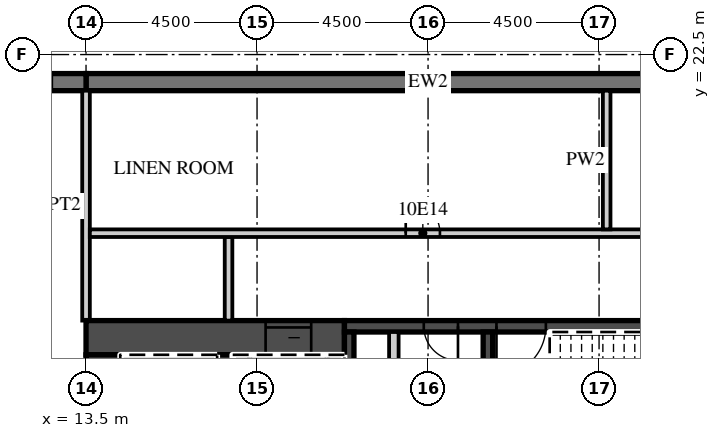
"""IFC4 building model, lengths in metres.
Left out: names, types, materials, properties, quantities, classifications, styles, units other than length and angle.
Written with IfcOpenShell. Run it as: python <this file> out.ifc"""

import sys

from ifc_helpers import new_model, si_unit, direction, frame, frame_2d, origin, place, context, subcontext, project, spatial, rectangle, extrude, element, fill, save


model = new_model("IFC4")
c1 = context("Model", 3, precision=1e-05, world=origin(), true_north=direction((0.0, 1.0)))
c2 = subcontext(c1, "Body", "Model", "MODEL_VIEW")
j1 = project(units=[si_unit("LENGTHUNIT", "METRE"), si_unit("PLANEANGLEUNIT", "RADIAN")], contexts=[c1])
p1 = place(None, origin())
s1 = spatial("IfcSite", under=j1, at=p1, CompositionType="ELEMENT")
p2 = place(p1, origin())
s2 = spatial("IfcBuilding", under=s1, at=p2, CompositionType="ELEMENT")
p3 = place(p2, frame((0.0, 0.0, 63.3)))
s3 = spatial("IfcBuildingStorey", under=s2, at=p3, CompositionType="ELEMENT", Elevation=63.3)
p4 = place(p3, frame((31.5, 21.775, 0.0), z_axis=(0.0, 0.0, 1.0), x_axis=(-1.0, 0.0, 0.0)))
e1 = element("IfcWall", 1, at=p4, inside=s3, PredefinedType="SOLIDWALL", context=c2, shape_type="SweptSolid", body=[
    extrude(rectangle(XDim=18.0, YDim=0.45, at=frame_2d((9.0, 0.0))), origin(), (0.0, 0.0, 1.0), 3.02),
])
p5 = place(p3, frame((13.5, 21.775, 0.0), z_axis=(0.0, 0.0, 1.0), x_axis=(-1.0, 0.0, 0.0)))
e2 = element("IfcWall", 2, at=p5, inside=s3, PredefinedType="SOLIDWALL", context=c2, shape_type="SweptSolid", body=[
    extrude(rectangle(XDim=54.5, YDim=0.45, at=frame_2d((27.25, 0.0))), origin(), (0.0, 0.0, 1.0), 3.02),
])
p6 = place(p5, frame((0.9, 0.0, 0.45)))
e3 = element("IfcOpeningElement", 3, at=p6, cuts=e2, PredefinedType="OPENING", context=c2, shape_type="SweptSolid", body=[
    extrude(rectangle(XDim=2.7, YDim=2.25, at=frame_2d((1.35, 1.125))), frame((0.0, 0.235, 0.0), z_axis=(0.0, -1.0, 0.0), x_axis=(1.0, 0.0, 0.0)), (0.0, 0.0, 1.0), 0.47),
])
p7 = place(p5, frame((5.4, 0.0, 0.45)))
e4 = element("IfcOpeningElement", 4, at=p7, cuts=e2, PredefinedType="OPENING", context=c2, shape_type="SweptSolid", body=[
    extrude(rectangle(XDim=2.7, YDim=2.25, at=frame_2d((1.35, 1.125))), frame((0.0, 0.235, 0.0), z_axis=(0.0, -1.0, 0.0), x_axis=(1.0, 0.0, 0.0)), (0.0, 0.0, 1.0), 0.47),
])
p8 = place(p5, frame((9.9, 0.0, 0.45)))
e5 = element("IfcOpeningElement", 5, at=p8, cuts=e2, PredefinedType="OPENING", context=c2, shape_type="SweptSolid", body=[
    extrude(rectangle(XDim=2.7, YDim=2.25, at=frame_2d((1.35, 1.125))), frame((0.0, 0.235, 0.0), z_axis=(0.0, -1.0, 0.0), x_axis=(1.0, 0.0, 0.0)), (0.0, 0.0, 1.0), 0.47),
])
p9 = place(p5, frame((14.4, 0.0, 0.45)))
e6 = element("IfcOpeningElement", 6, at=p9, cuts=e2, PredefinedType="OPENING", context=c2, shape_type="SweptSolid", body=[
    extrude(rectangle(XDim=2.7, YDim=2.25, at=frame_2d((1.35, 1.125))), frame((0.0, 0.235, 0.0), z_axis=(0.0, -1.0, 0.0), x_axis=(1.0, 0.0, 0.0)), (0.0, 0.0, 1.0), 0.47),
])
p10 = place(p5, frame((18.9, 0.0, 0.45)))
e7 = element("IfcOpeningElement", 7, at=p10, cuts=e2, PredefinedType="OPENING", context=c2, shape_type="SweptSolid", body=[
    extrude(rectangle(XDim=2.7, YDim=2.25, at=frame_2d((1.35, 1.125))), frame((0.0, 0.235, 0.0), z_axis=(0.0, -1.0, 0.0), x_axis=(1.0, 0.0, 0.0)), (0.0, 0.0, 1.0), 0.47),
])
p11 = place(p5, frame((23.4, 0.0, 0.45)))
e8 = element("IfcOpeningElement", 8, at=p11, cuts=e2, PredefinedType="OPENING", context=c2, shape_type="SweptSolid", body=[
    extrude(rectangle(XDim=2.7, YDim=2.25, at=frame_2d((1.35, 1.125))), frame((0.0, 0.235, 0.0), z_axis=(0.0, -1.0, 0.0), x_axis=(1.0, 0.0, 0.0)), (0.0, 0.0, 1.0), 0.47),
])
p12 = place(p5, frame((27.9, 0.0, 0.45)))
e9 = element("IfcOpeningElement", 9, at=p12, cuts=e2, PredefinedType="OPENING", context=c2, shape_type="SweptSolid", body=[
    extrude(rectangle(XDim=2.7, YDim=2.25, at=frame_2d((1.35, 1.125))), frame((0.0, 0.235, 0.0), z_axis=(0.0, -1.0, 0.0), x_axis=(1.0, 0.0, 0.0)), (0.0, 0.0, 1.0), 0.47),
])
p13 = place(p5, frame((32.4, 0.0, 0.45)))
e10 = element("IfcOpeningElement", 10, at=p13, cuts=e2, PredefinedType="OPENING", context=c2, shape_type="SweptSolid", body=[
    extrude(rectangle(XDim=2.7, YDim=2.25, at=frame_2d((1.35, 1.125))), frame((0.0, 0.235, 0.0), z_axis=(0.0, -1.0, 0.0), x_axis=(1.0, 0.0, 0.0)), (0.0, 0.0, 1.0), 0.47),
])
p14 = place(p5, frame((36.9, 0.0, 0.45)))
e11 = element("IfcOpeningElement", 11, at=p14, cuts=e2, PredefinedType="OPENING", context=c2, shape_type="SweptSolid", body=[
    extrude(rectangle(XDim=2.7, YDim=2.25, at=frame_2d((1.35, 1.125))), frame((0.0, 0.235, 0.0), z_axis=(0.0, -1.0, 0.0), x_axis=(1.0, 0.0, 0.0)), (0.0, 0.0, 1.0), 0.47),
])
p15 = place(p5, frame((41.4, 0.0, 0.45)))
e12 = element("IfcOpeningElement", 12, at=p15, cuts=e2, PredefinedType="OPENING", context=c2, shape_type="SweptSolid", body=[
    extrude(rectangle(XDim=2.7, YDim=2.25, at=frame_2d((1.35, 1.125))), frame((0.0, 0.235, 0.0), z_axis=(0.0, -1.0, 0.0), x_axis=(1.0, 0.0, 0.0)), (0.0, 0.0, 1.0), 0.47),
])
p16 = place(p5, frame((45.9, 0.0, 0.45)))
e13 = element("IfcOpeningElement", 13, at=p16, cuts=e2, PredefinedType="OPENING", context=c2, shape_type="SweptSolid", body=[
    extrude(rectangle(XDim=2.7, YDim=2.25, at=frame_2d((1.35, 1.125))), frame((0.0, 0.235, 0.0), z_axis=(0.0, -1.0, 0.0), x_axis=(1.0, 0.0, 0.0)), (0.0, 0.0, 1.0), 0.47),
])
p17 = place(p5, frame((50.4, 0.0, 0.45)))
e14 = element("IfcOpeningElement", 14, at=p17, cuts=e2, PredefinedType="OPENING", context=c2, shape_type="SweptSolid", body=[
    extrude(rectangle(XDim=2.7, YDim=2.25, at=frame_2d((1.35, 1.125))), frame((0.0, 0.235, 0.0), z_axis=(0.0, -1.0, 0.0), x_axis=(1.0, 0.0, 0.0)), (0.0, 0.0, 1.0), 0.47),
])
p18 = place(p3, frame((13.5, 15.5, 0.0), z_axis=(0.0, 0.0, 1.0), x_axis=(0.0, 1.0, 0.0)))
e15 = element("IfcWall", 15, at=p18, inside=s3, PredefinedType="PARTITIONING", context=c2, shape_type="SweptSolid", body=[
    extrude(rectangle(XDim=6.05, YDim=0.2, at=frame_2d((3.025, 0.0))), origin(), (0.0, 0.0, 1.0), 3.02),
])
p19 = place(p3, frame((13.5, 15.05, 0.0), z_axis=(0.0, 0.0, 1.0), x_axis=(1.0, 0.0, 0.0)))
e16 = element("IfcWall", 16, at=p19, inside=s3, PredefinedType="SHEAR", context=c2, shape_type="SweptSolid", body=[
    extrude(rectangle(XDim=6.8, YDim=0.9, at=frame_2d((3.4, 0.0))), origin(), (0.0, 0.0, 1.0), 3.02),
])
p20 = place(p19, frame((4.725, 0.0, 0.0)))
e17 = element("IfcOpeningElement", 17, at=p20, cuts=e16, PredefinedType="OPENING", context=c2, shape_type="SweptSolid", body=[
    extrude(rectangle(XDim=1.2, YDim=2.1, at=frame_2d((0.6, 1.05))), frame((0.0, 0.46, 0.0), z_axis=(0.0, -1.0, 0.0), x_axis=(1.0, 0.0, 0.0)), (0.0, 0.0, 1.0), 0.92),
])
p21 = place(p3, frame((20.3, 15.35, 0.0), z_axis=(0.0, 0.0, 1.0), x_axis=(1.0, 0.0, 0.0)))
e18 = element("IfcWall", 18, at=p21, inside=s3, PredefinedType="SHEAR", context=c2, shape_type="SweptSolid", body=[
    extrude(rectangle(XDim=10.3, YDim=0.3, at=frame_2d((5.15, 0.0))), origin(), (0.0, 0.0, 1.0), 3.02),
])
p22 = place(p21, frame((4.0, 0.0, 0.0)))
e19 = element("IfcOpeningElement", 19, at=p22, cuts=e18, PredefinedType="OPENING", context=c2, shape_type="SweptSolid", body=[
    extrude(rectangle(XDim=1.3, YDim=2.1, at=frame_2d((0.65, 1.05))), frame((0.0, 0.16, 0.0), z_axis=(0.0, -1.0, 0.0), x_axis=(1.0, 0.0, 0.0)), (0.0, 0.0, 1.0), 0.32),
])
p23 = place(p21, frame((2.087, 0.0, 0.0)))
e20 = element("IfcOpeningElement", 20, at=p23, cuts=e18, PredefinedType="OPENING", context=c2, shape_type="SweptSolid", body=[
    extrude(rectangle(XDim=0.9, YDim=2.1, at=frame_2d((0.45, 1.05))), frame((0.0, 0.16, 0.0), z_axis=(0.0, -1.0, 0.0), x_axis=(1.0, 0.0, 0.0)), (0.0, 0.0, 1.0), 0.32),
])
p24 = place(p3, frame((13.95, 2.4, 0.0), z_axis=(0.0, 0.0, 1.0), x_axis=(0.0, 1.0, 0.0)))
e21 = element("IfcWall", 21, at=p24, inside=s3, PredefinedType="SHEAR", context=c2, shape_type="SweptSolid", body=[
    extrude(rectangle(XDim=12.2, YDim=0.9, at=frame_2d((6.1, 0.0))), origin(), (0.0, 0.0, 1.0), 3.02),
])
p25 = place(p3, frame((17.15, 8.8, 0.0), z_axis=(0.0, 0.0, 1.0), x_axis=(0.0, 1.0, 0.0)))
e22 = element("IfcWall", 22, at=p25, inside=s3, PredefinedType="SHEAR", context=c2, shape_type="SweptSolid", body=[
    extrude(rectangle(XDim=5.8, YDim=0.4, at=frame_2d((2.9, 0.0))), origin(), (0.0, 0.0, 1.0), 3.02),
])
for number, where, z_axis, x_axis in (
    (23, (20.425, 11.95, 0.0), (0.0, 0.0, 1.0), (0.0, 1.0, 0.0)),
    (24, (24.075, 11.95, 0.0), (0.0, 0.0, 1.0), (0.0, 1.0, 0.0)),
):
    element("IfcWall", number, at=place(p3, frame(where, z_axis=z_axis, x_axis=x_axis)), inside=s3, PredefinedType="SHEAR", context=c2, shape_type="SweptSolid", body=[
        extrude(rectangle(XDim=3.25, YDim=0.25, at=frame_2d((1.625, 0.0))), origin(), (0.0, 0.0, 1.0), 3.02),
    ])
p26 = place(p3, frame((21.6, 11.95, 0.0), z_axis=(0.0, 0.0, 1.0), x_axis=(0.0, 1.0, 0.0)))
e25 = element("IfcWall", 25, at=p26, inside=s3, PredefinedType="PARTITIONING", context=c2, shape_type="SweptSolid", body=[
    extrude(rectangle(XDim=3.25, YDim=0.25, at=frame_2d((1.625, 0.0))), origin(), (0.0, 0.0, 1.0), 3.02),
])
p27 = place(p3, frame((17.25, 15.5, 0.0), z_axis=(0.0, 0.0, 1.0), x_axis=(0.0, 1.0, 0.0)))
e26 = element("IfcWall", 26, at=p27, inside=s3, PredefinedType="PARTITIONING", context=c2, shape_type="SweptSolid", body=[
    extrude(rectangle(XDim=2.2, YDim=0.2, at=frame_2d((1.1, 0.0))), origin(), (0.0, 0.0, 1.0), 3.02),
])
p28 = place(p3, frame((13.6, 17.8, 0.0), z_axis=(0.0, 0.0, 1.0), x_axis=(1.0, 0.0, 0.0)))
e27 = element("IfcWall", 27, at=p28, inside=s3, PredefinedType="PARTITIONING", context=c2, shape_type="SweptSolid", body=[
    extrude(rectangle(XDim=30.95, YDim=0.2, at=frame_2d((15.475, 0.0))), origin(), (0.0, 0.0, 1.0), 3.02),
])
p29 = place(p28, frame((16.613, 0.0, 0.0)))
e28 = element("IfcOpeningElement", 28, at=p29, cuts=e27, PredefinedType="OPENING", context=c2, shape_type="SweptSolid", body=[
    extrude(rectangle(XDim=0.9, YDim=2.1, at=frame_2d((0.45, 1.05))), frame((0.0, 0.11, 0.0), z_axis=(0.0, -1.0, 0.0), x_axis=(1.0, 0.0, 0.0)), (0.0, 0.0, 1.0), 0.22),
])
p30 = place(p28, frame((8.312, 0.0, 0.0)))
e29 = element("IfcOpeningElement", 29, at=p30, cuts=e27, PredefinedType="OPENING", context=c2, shape_type="SweptSolid", body=[
    extrude(rectangle(XDim=0.9, YDim=2.1, at=frame_2d((0.45, 1.05))), frame((0.0, 0.11, 0.0), z_axis=(0.0, -1.0, 0.0), x_axis=(1.0, 0.0, 0.0)), (0.0, 0.0, 1.0), 0.22),
])
p31 = place(p3, frame((27.2, 17.9, 0.0), z_axis=(0.0, 0.0, 1.0), x_axis=(0.0, 1.0, 0.0)))
e30 = element("IfcWall", 30, at=p31, inside=s3, PredefinedType="PARTITIONING", context=c2, shape_type="SweptSolid", body=[
    extrude(rectangle(XDim=3.65, YDim=0.2, at=frame_2d((1.825, 0.0))), origin(), (0.0, 0.0, 1.0), 3.02),
])
p32 = place(p20, origin())
e31 = element("IfcDoor", 31, at=p32, inside=s3, OperationType="SLIDING_TO_LEFT", PredefinedType="DOOR", context=c2, shape_type="SweptSolid", body=[
    extrude(rectangle(XDim=1.2, YDim=2.1, at=frame_2d((0.6, 1.05))), frame((0.0, 0.025, 0.0), z_axis=(0.0, -1.0, 0.0), x_axis=(1.0, 0.0, 0.0)), (0.0, 0.0, 1.0), 0.05),
])
fill(e17, e31)
p33 = place(p22, origin())
e32 = element("IfcDoor", 32, at=p33, inside=s3, OperationType="SINGLE_SWING_LEFT", PredefinedType="DOOR", context=c2, shape_type="SweptSolid", body=[
    extrude(rectangle(XDim=1.3, YDim=2.1, at=frame_2d((0.65, 1.05))), frame((0.0, 0.025, 0.0), z_axis=(0.0, -1.0, 0.0), x_axis=(1.0, 0.0, 0.0)), (0.0, 0.0, 1.0), 0.05),
])
fill(e19, e32)
p34 = place(p23, origin())
e33 = element("IfcDoor", 33, at=p34, inside=s3, OperationType="SINGLE_SWING_RIGHT", PredefinedType="DOOR", context=c2, shape_type="SweptSolid", body=[
    extrude(rectangle(XDim=0.9, YDim=2.1, at=frame_2d((0.45, 1.05))), frame((0.0, 0.025, 0.0), z_axis=(0.0, -1.0, 0.0), x_axis=(1.0, 0.0, 0.0)), (0.0, 0.0, 1.0), 0.05),
])
fill(e20, e33)
p35 = place(p30, origin())
e34 = element("IfcDoor", 34, at=p35, inside=s3, OperationType="SINGLE_SWING_LEFT", PredefinedType="DOOR", context=c2, shape_type="SweptSolid", body=[
    extrude(rectangle(XDim=0.9, YDim=2.1, at=frame_2d((0.45, 1.05))), frame((0.0, 0.025, 0.0), z_axis=(0.0, -1.0, 0.0), x_axis=(1.0, 0.0, 0.0)), (0.0, 0.0, 1.0), 0.05),
])
fill(e29, e34)
save(model, sys.argv[1])
